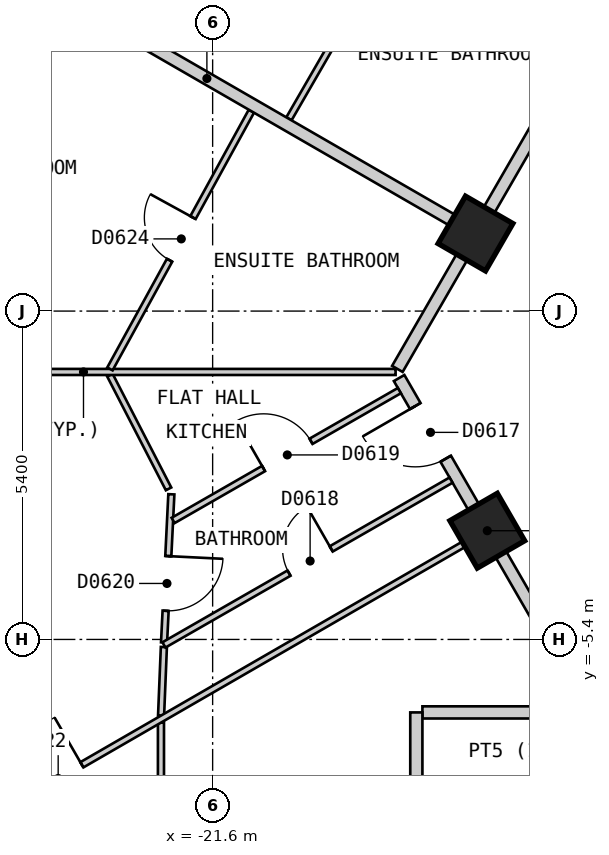
"""IFC4 building model, lengths in metres.
Left out: names, types, materials, properties, quantities, classifications, styles, units other than length and angle.
Written with IfcOpenShell. Run it as: python <this file> out.ifc"""

import sys

from ifc_helpers import new_model, si_unit, direction, frame, frame_2d, origin, origin_2d, place, context, subcontext, project, spatial, polyline, rectangle, outline, extrude, element, fill, save


model = new_model("IFC4")
c1 = context("Model", 3, precision=1e-05, world=origin(), true_north=direction((0.0, 1.0)))
c2 = subcontext(c1, "Body", "Model", "MODEL_VIEW")
j1 = project(units=[si_unit("LENGTHUNIT", "METRE"), si_unit("PLANEANGLEUNIT", "RADIAN")], contexts=[c1])
p1 = place(None, origin())
s1 = spatial("IfcSite", under=j1, at=p1, CompositionType="ELEMENT")
p2 = place(p1, origin())
s2 = spatial("IfcBuilding", under=s1, at=p2, CompositionType="ELEMENT")
p3 = place(p2, frame((0.0, 0.0, 75.0)))
s3 = spatial("IfcBuildingStorey", under=s2, at=p3, CompositionType="ELEMENT", Elevation=75.0)
for number, where, z_axis, x_axis in (
    (1, (-17.083, -3.612, 0.0), (0.0, 0.0, 1.0), (0.5, -0.866, 0.0)),
    (2, (-17.277, 1.275, 0.0), (0.0, 0.0, 1.0), (-0.5, -0.866, 0.0)),
):
    element("IfcColumn", number, at=place(p3, frame(where, z_axis=z_axis, x_axis=x_axis)), inside=s3, PredefinedType="COLUMN", context=c2, shape_type="SweptSolid", body=[
        extrude(rectangle(XDim=0.9, YDim=0.9, at=origin_2d()), origin(), (0.0, 0.0, 1.0), 3.0),
    ])
p4 = place(p3, frame((-15.747, 24.425, 0.0), z_axis=(0.0, 0.0, 1.0), x_axis=(-0.500027479704, -0.866009537788, 0.0)))
e3 = element("IfcWall", 3, at=p4, inside=s3, PredefinedType="SOLIDWALL", context=c2, shape_type="SweptSolid", body=[
    extrude(outline(polyline([(0.0, -0.15), (26.559, -0.15), (26.478, 0.15), (0.08, 0.15), (0.0, -0.15)])), origin(), (0.0, 0.0, 1.0), 2.7),
])
p5 = place(p4, frame((1.227, 0.0, 0.15)))
e4 = element("IfcOpeningElement", 4, at=p5, cuts=e3, PredefinedType="OPENING", context=c2, shape_type="SweptSolid", body=[
    extrude(rectangle(XDim=1.5, YDim=2.1, at=frame_2d((0.75, 1.05))), frame((0.0, 0.16, 0.0), z_axis=(0.0, -1.0, 0.0), x_axis=(1.0, 0.0, 0.0)), (0.0, 0.0, 1.0), 0.32),
])
p6 = place(p4, frame((3.739, 0.0, 0.15)))
e5 = element("IfcOpeningElement", 5, at=p6, cuts=e3, PredefinedType="OPENING", context=c2, shape_type="SweptSolid", body=[
    extrude(rectangle(XDim=1.5, YDim=2.1, at=frame_2d((0.75, 1.05))), frame((0.0, 0.16, 0.0), z_axis=(0.0, -1.0, 0.0), x_axis=(1.0, 0.0, 0.0)), (0.0, 0.0, 1.0), 0.32),
])
p7 = place(p4, frame((6.25, 0.0, 0.15)))
e6 = element("IfcOpeningElement", 6, at=p7, cuts=e3, PredefinedType="OPENING", context=c2, shape_type="SweptSolid", body=[
    extrude(rectangle(XDim=1.5, YDim=2.1, at=frame_2d((0.75, 1.05))), frame((0.0, 0.16, 0.0), z_axis=(0.0, -1.0, 0.0), x_axis=(1.0, 0.0, 0.0)), (0.0, 0.0, 1.0), 0.32),
])
p8 = place(p4, frame((8.761, 0.0, 0.15)))
e7 = element("IfcOpeningElement", 7, at=p8, cuts=e3, PredefinedType="OPENING", context=c2, shape_type="SweptSolid", body=[
    extrude(rectangle(XDim=1.5, YDim=2.1, at=frame_2d((0.75, 1.05))), frame((0.0, 0.16, 0.0), z_axis=(0.0, -1.0, 0.0), x_axis=(1.0, 0.0, 0.0)), (0.0, 0.0, 1.0), 0.32),
])
p9 = place(p4, frame((11.273, 0.0, 0.15)))
e8 = element("IfcOpeningElement", 8, at=p9, cuts=e3, PredefinedType="OPENING", context=c2, shape_type="SweptSolid", body=[
    extrude(rectangle(XDim=1.5, YDim=2.1, at=frame_2d((0.75, 1.05))), frame((0.0, 0.16, 0.0), z_axis=(0.0, -1.0, 0.0), x_axis=(1.0, 0.0, 0.0)), (0.0, 0.0, 1.0), 0.32),
])
p10 = place(p4, frame((13.785, 0.0, 0.15)))
e9 = element("IfcOpeningElement", 9, at=p10, cuts=e3, PredefinedType="OPENING", context=c2, shape_type="SweptSolid", body=[
    extrude(rectangle(XDim=1.5, YDim=2.1, at=frame_2d((0.75, 1.05))), frame((0.0, 0.16, 0.0), z_axis=(0.0, -1.0, 0.0), x_axis=(1.0, 0.0, 0.0)), (0.0, 0.0, 1.0), 0.32),
])
p11 = place(p4, frame((16.296, 0.0, 0.15)))
e10 = element("IfcOpeningElement", 10, at=p11, cuts=e3, PredefinedType="OPENING", context=c2, shape_type="SweptSolid", body=[
    extrude(rectangle(XDim=1.5, YDim=2.1, at=frame_2d((0.75, 1.05))), frame((0.0, 0.16, 0.0), z_axis=(0.0, -1.0, 0.0), x_axis=(1.0, 0.0, 0.0)), (0.0, 0.0, 1.0), 0.32),
])
p12 = place(p4, frame((18.807, 0.0, 0.15)))
e11 = element("IfcOpeningElement", 11, at=p12, cuts=e3, PredefinedType="OPENING", context=c2, shape_type="SweptSolid", body=[
    extrude(rectangle(XDim=1.5, YDim=2.1, at=frame_2d((0.75, 1.05))), frame((0.0, 0.16, 0.0), z_axis=(0.0, -1.0, 0.0), x_axis=(1.0, 0.0, 0.0)), (0.0, 0.0, 1.0), 0.32),
])
p13 = place(p4, frame((21.319, 0.0, 0.15)))
e12 = element("IfcOpeningElement", 12, at=p13, cuts=e3, PredefinedType="OPENING", context=c2, shape_type="SweptSolid", body=[
    extrude(rectangle(XDim=1.5, YDim=2.1, at=frame_2d((0.75, 1.05))), frame((0.0, 0.16, 0.0), z_axis=(0.0, -1.0, 0.0), x_axis=(1.0, 0.0, 0.0)), (0.0, 0.0, 1.0), 0.32),
])
p14 = place(p4, frame((23.831, 0.0, 0.15)))
e13 = element("IfcOpeningElement", 13, at=p14, cuts=e3, PredefinedType="OPENING", context=c2, shape_type="SweptSolid", body=[
    extrude(rectangle(XDim=1.5, YDim=2.1, at=frame_2d((0.75, 1.05))), frame((0.0, 0.16, 0.0), z_axis=(0.0, -1.0, 0.0), x_axis=(1.0, 0.0, 0.0)), (0.0, 0.0, 1.0), 0.32),
])
p15 = place(p3, frame((-29.027, -3.425, 0.0), z_axis=(0.0, 0.0, 1.0), x_axis=(0.500035407905, -0.866004960056, 0.0)))
e14 = element("IfcWall", 14, at=p15, inside=s3, PredefinedType="SOLIDWALL", context=c2, shape_type="SweptSolid", body=[
    extrude(outline(polyline([(0.0, -0.15), (23.094, -0.15), (23.014, 0.15), (0.08, 0.15), (0.0, -0.15)])), origin(), (0.0, 0.0, 1.0), 2.7),
])
p16 = place(p15, frame((1.324, 0.0, 0.15)))
e15 = element("IfcOpeningElement", 15, at=p16, cuts=e14, PredefinedType="OPENING", context=c2, shape_type="SweptSolid", body=[
    extrude(rectangle(XDim=1.5, YDim=2.1, at=frame_2d((0.75, 1.05))), frame((0.0, 0.16, 0.0), z_axis=(0.0, -1.0, 0.0), x_axis=(1.0, 0.0, 0.0)), (0.0, 0.0, 1.0), 0.32),
])
p17 = place(p15, frame((4.031, 0.0, 0.15)))
e16 = element("IfcOpeningElement", 16, at=p17, cuts=e14, PredefinedType="OPENING", context=c2, shape_type="SweptSolid", body=[
    extrude(rectangle(XDim=1.5, YDim=2.1, at=frame_2d((0.75, 1.05))), frame((0.0, 0.16, 0.0), z_axis=(0.0, -1.0, 0.0), x_axis=(1.0, 0.0, 0.0)), (0.0, 0.0, 1.0), 0.32),
])
p18 = place(p15, frame((6.737, 0.0, 0.15)))
e17 = element("IfcOpeningElement", 17, at=p18, cuts=e14, PredefinedType="OPENING", context=c2, shape_type="SweptSolid", body=[
    extrude(rectangle(XDim=1.5, YDim=2.1, at=frame_2d((0.75, 1.05))), frame((0.0, 0.16, 0.0), z_axis=(0.0, -1.0, 0.0), x_axis=(1.0, 0.0, 0.0)), (0.0, 0.0, 1.0), 0.32),
])
p19 = place(p15, frame((9.444, 0.0, 0.15)))
e18 = element("IfcOpeningElement", 18, at=p19, cuts=e14, PredefinedType="OPENING", context=c2, shape_type="SweptSolid", body=[
    extrude(rectangle(XDim=1.5, YDim=2.1, at=frame_2d((0.75, 1.05))), frame((0.0, 0.16, 0.0), z_axis=(0.0, -1.0, 0.0), x_axis=(1.0, 0.0, 0.0)), (0.0, 0.0, 1.0), 0.32),
])
p20 = place(p15, frame((12.151, 0.0, 0.15)))
e19 = element("IfcOpeningElement", 19, at=p20, cuts=e14, PredefinedType="OPENING", context=c2, shape_type="SweptSolid", body=[
    extrude(rectangle(XDim=1.5, YDim=2.1, at=frame_2d((0.75, 1.05))), frame((0.0, 0.16, 0.0), z_axis=(0.0, -1.0, 0.0), x_axis=(1.0, 0.0, 0.0)), (0.0, 0.0, 1.0), 0.32),
])
p21 = place(p15, frame((14.857, 0.0, 0.15)))
e20 = element("IfcOpeningElement", 20, at=p21, cuts=e14, PredefinedType="OPENING", context=c2, shape_type="SweptSolid", body=[
    extrude(rectangle(XDim=1.5, YDim=2.1, at=frame_2d((0.75, 1.05))), frame((0.0, 0.16, 0.0), z_axis=(0.0, -1.0, 0.0), x_axis=(1.0, 0.0, 0.0)), (0.0, 0.0, 1.0), 0.32),
])
p22 = place(p15, frame((17.564, 0.0, 0.15)))
e21 = element("IfcOpeningElement", 21, at=p22, cuts=e14, PredefinedType="OPENING", context=c2, shape_type="SweptSolid", body=[
    extrude(rectangle(XDim=1.5, YDim=2.1, at=frame_2d((0.75, 1.05))), frame((0.0, 0.16, 0.0), z_axis=(0.0, -1.0, 0.0), x_axis=(1.0, 0.0, 0.0)), (0.0, 0.0, 1.0), 0.32),
])
p23 = place(p15, frame((20.27, 0.0, 0.15)))
e22 = element("IfcOpeningElement", 22, at=p23, cuts=e14, PredefinedType="OPENING", context=c2, shape_type="SweptSolid", body=[
    extrude(rectangle(XDim=1.5, YDim=2.1, at=frame_2d((0.75, 1.05))), frame((0.0, 0.16, 0.0), z_axis=(0.0, -1.0, 0.0), x_axis=(1.0, 0.0, 0.0)), (0.0, 0.0, 1.0), 0.32),
])
p24 = place(p3, frame((-18.533, -1.101, 0.0), z_axis=(0.0, 0.0, 1.0), x_axis=(0.500022085096, -0.866012652573, 0.0)))
e23 = element("IfcWall", 23, at=p24, inside=s3, PredefinedType="PARTITIONING", context=c2, shape_type="SweptSolid", body=[
    extrude(rectangle(XDim=6.066, YDim=0.2, at=frame_2d((3.033, 0.0))), origin(), (0.0, 0.0, 1.0), 2.7),
])
p25 = place(p24, frame((0.532, 0.0, 0.0)))
e24 = element("IfcOpeningElement", 24, at=p25, cuts=e23, PredefinedType="OPENING", context=c2, shape_type="SweptSolid", body=[
    extrude(rectangle(XDim=1.0, YDim=2.1, at=frame_2d((0.5, 1.05))), frame((0.0, 0.11, 0.0), z_axis=(0.0, -1.0, 0.0), x_axis=(1.0, 0.0, 0.0)), (0.0, 0.0, 1.0), 0.22),
])
p26 = place(p3, frame((-18.15, -6.6, 0.0), z_axis=(0.0, 0.0, 1.0), x_axis=(1.0, 0.0, 0.0)))
e25 = element("IfcWall", 25, at=p26, inside=s3, PredefinedType="PARTITIONING", context=c2, shape_type="SweptSolid", body=[
    extrude(rectangle(XDim=2.649, YDim=0.2, at=frame_2d((1.324, 0.0))), origin(), (0.0, 0.0, 1.0), 2.7),
])
p27 = place(p3, frame((-18.562, -0.951, 0.0), z_axis=(0.0, 0.0, 1.0), x_axis=(0.499992962407, 0.866029466902, 0.0)))
e26 = element("IfcWall", 26, at=p27, inside=s3, PredefinedType="PARTITIONING", context=c2, shape_type="SweptSolid", body=[
    extrude(rectangle(XDim=20.208, YDim=0.2, at=frame_2d((10.104, 0.0))), origin(), (0.0, 0.0, 1.0), 2.7),
])
p28 = place(p27, frame((9.604, 0.0, 0.0)))
e27 = element("IfcOpeningElement", 27, at=p28, cuts=e26, PredefinedType="OPENING", context=c2, shape_type="SweptSolid", body=[
    extrude(rectangle(XDim=1.0, YDim=2.1, at=frame_2d((0.5, 1.05))), frame((0.0, 0.11, 0.0), z_axis=(0.0, -1.0, 0.0), x_axis=(1.0, 0.0, 0.0)), (0.0, 0.0, 1.0), 0.22),
])
p29 = place(p3, frame((-18.25, -14.386, 0.0), z_axis=(0.0, 0.0, 1.0), x_axis=(0.0, 1.0, 0.0)))
e28 = element("IfcWall", 28, at=p29, inside=s3, PredefinedType="PARTITIONING", context=c2, shape_type="SweptSolid", body=[
    extrude(rectangle(XDim=7.786, YDim=0.2, at=frame_2d((3.893, 0.0))), origin(), (0.0, 0.0, 1.0), 2.7),
])
p30 = place(p29, frame((0.34, 0.0, 0.0)))
e29 = element("IfcOpeningElement", 29, at=p30, cuts=e28, PredefinedType="OPENING", context=c2, shape_type="SweptSolid", body=[
    extrude(rectangle(XDim=1.0, YDim=2.1, at=frame_2d((0.5, 1.05))), frame((0.0, 0.11, 0.0), z_axis=(0.0, -1.0, 0.0), x_axis=(1.0, 0.0, 0.0)), (0.0, 0.0, 1.0), 0.22),
])
p31 = place(p3, frame((-23.289, -1.054, 0.0), z_axis=(0.0, 0.0, 1.0), x_axis=(0.458226112305, -0.888835659726, 0.0)))
e30 = element("IfcWall", 30, at=p31, inside=s3, PredefinedType="PARTITIONING", context=c2, shape_type="SweptSolid", body=[
    extrude(rectangle(XDim=2.104, YDim=0.1, at=frame_2d((1.052, 0.0))), origin(), (0.0, 0.0, 1.0), 2.7),
])
p32 = place(p3, frame((-28.857, -1.001, 0.0), z_axis=(0.0, 0.0, 1.0), x_axis=(1.0, 0.0, 0.0)))
e31 = element("IfcWall", 31, at=p32, inside=s3, PredefinedType="PARTITIONING", context=c2, shape_type="SweptSolid", body=[
    extrude(rectangle(XDim=10.266, YDim=0.1, at=frame_2d((5.133, 0.0))), origin(), (0.0, 0.0, 1.0), 2.7),
])
p33 = place(p32, frame((2.32, 0.0, 0.0)))
e32 = element("IfcOpeningElement", 32, at=p33, cuts=e31, PredefinedType="OPENING", context=c2, shape_type="SweptSolid", body=[
    extrude(rectangle(XDim=0.9, YDim=2.1, at=frame_2d((0.45, 1.05))), frame((0.0, 0.06, 0.0), z_axis=(0.0, -1.0, 0.0), x_axis=(1.0, 0.0, 0.0)), (0.0, 0.0, 1.0), 0.12),
])
p34 = place(p3, frame((-20.345, 3.162, 0.0), z_axis=(0.0, 0.0, 1.0), x_axis=(0.499943653708, 0.866057932887, 0.0)))
e33 = element("IfcWall", 33, at=p34, inside=s3, PredefinedType="PARTITIONING", context=c2, shape_type="SweptSolid", body=[
    extrude(rectangle(XDim=4.873, YDim=0.1, at=frame_2d((2.436, 0.0))), origin(), (0.0, 0.0, 1.0), 2.7),
])
p35 = place(p34, frame((2.011, 0.0, 0.0)))
e34 = element("IfcOpeningElement", 34, at=p35, cuts=e33, PredefinedType="OPENING", context=c2, shape_type="SweptSolid", body=[
    extrude(rectangle(XDim=0.8, YDim=2.1, at=frame_2d((0.4, 1.05))), frame((0.0, 0.06, 0.0), z_axis=(0.0, -1.0, 0.0), x_axis=(1.0, 0.0, 0.0)), (0.0, 0.0, 1.0), 0.12),
])
p36 = place(p3, frame((-23.289, -0.951, 0.0), z_axis=(0.0, 0.0, 1.0), x_axis=(0.481164463081, 0.876630343684, 0.0)))
e35 = element("IfcWall", 35, at=p36, inside=s3, PredefinedType="PARTITIONING", context=c2, shape_type="SweptSolid", body=[
    extrude(rectangle(XDim=4.834, YDim=0.1, at=frame_2d((2.417, 0.0))), origin(), (0.0, 0.0, 1.0), 2.7),
])
p37 = place(p36, frame((2.039, 0.0, 0.0)))
e36 = element("IfcOpeningElement", 36, at=p37, cuts=e35, PredefinedType="OPENING", context=c2, shape_type="SweptSolid", body=[
    extrude(rectangle(XDim=0.8, YDim=2.1, at=frame_2d((0.4, 1.05))), frame((0.0, 0.06, 0.0), z_axis=(0.0, -1.0, 0.0), x_axis=(1.0, 0.0, 0.0)), (0.0, 0.0, 1.0), 0.12),
])
p38 = place(p3, frame((-22.399, -5.45, 0.0), z_axis=(0.0, 0.0, 1.0), x_axis=(0.049129140995, 0.998792434646, 0.0)))
e37 = element("IfcWall", 37, at=p38, inside=s3, PredefinedType="PARTITIONING", context=c2, shape_type="SweptSolid", body=[
    extrude(rectangle(XDim=2.44, YDim=0.1, at=frame_2d((1.22, 0.0))), origin(), (0.0, 0.0, 1.0), 2.7),
])
p39 = place(p38, frame((0.522, 0.0, 0.0)))
e38 = element("IfcOpeningElement", 38, at=p39, cuts=e37, PredefinedType="OPENING", context=c2, shape_type="SweptSolid", body=[
    extrude(rectangle(XDim=0.9, YDim=2.1, at=frame_2d((0.45, 1.05))), frame((0.0, 0.06, 0.0), z_axis=(0.0, -1.0, 0.0), x_axis=(1.0, 0.0, 0.0)), (0.0, 0.0, 1.0), 0.12),
])
p40 = place(p3, frame((-22.448, -6.651, 0.0), z_axis=(0.0, 0.0, 1.0), x_axis=(0.040729401597, 0.99917021365, 0.0)))
e39 = element("IfcWall", 39, at=p40, inside=s3, PredefinedType="PARTITIONING", context=c2, shape_type="SweptSolid", body=[
    extrude(rectangle(XDim=1.127, YDim=0.1, at=frame_2d((0.563, 0.0))), origin(), (0.0, 0.0, 1.0), 2.7),
])
p41 = place(p3, frame((-22.45, -12.846, 0.0), z_axis=(0.0, 0.0, 1.0), x_axis=(0.0, 1.0, 0.0)))
e40 = element("IfcWall", 40, at=p41, inside=s3, PredefinedType="PARTITIONING", context=c2, shape_type="SweptSolid", body=[
    extrude(rectangle(XDim=6.078, YDim=0.1, at=frame_2d((3.039, 0.0))), origin(), (0.0, 0.0, 1.0), 2.7),
])
p42 = place(p41, frame((2.61, 0.0, 0.0)))
e41 = element("IfcOpeningElement", 41, at=p42, cuts=e40, PredefinedType="OPENING", context=c2, shape_type="SweptSolid", body=[
    extrude(rectangle(XDim=0.8, YDim=2.1, at=frame_2d((0.4, 1.05))), frame((0.0, 0.06, 0.0), z_axis=(0.0, -1.0, 0.0), x_axis=(1.0, 0.0, 0.0)), (0.0, 0.0, 1.0), 0.12),
])
p43 = place(p3, frame((-25.83, -8.662, 0.0), z_axis=(0.0, 0.0, 1.0), x_axis=(0.866022959057, 0.500004234368, 0.0)))
e42 = element("IfcWall", 42, at=p43, inside=s3, PredefinedType="PARTITIONING", context=c2, shape_type="SweptSolid", body=[
    extrude(rectangle(XDim=10.0, YDim=0.1, at=frame_2d((5.0, 0.0))), origin(), (0.0, 0.0, 1.0), 2.7),
])
p44 = place(p43, frame((1.501, 0.0, 0.0)))
e43 = element("IfcOpeningElement", 43, at=p44, cuts=e42, PredefinedType="OPENING", context=c2, shape_type="SweptSolid", body=[
    extrude(rectangle(XDim=0.9, YDim=2.1, at=frame_2d((0.45, 1.05))), frame((0.0, 0.06, 0.0), z_axis=(0.0, -1.0, 0.0), x_axis=(1.0, 0.0, 0.0)), (0.0, 0.0, 1.0), 0.12),
])
p45 = place(p3, frame((-22.401, -5.49, 0.0), z_axis=(0.0, 0.0, 1.0), x_axis=(0.867314404256, 0.497760709749, 0.0)))
e44 = element("IfcWall", 44, at=p45, inside=s3, PredefinedType="PARTITIONING", context=c2, shape_type="SweptSolid", body=[
    extrude(rectangle(XDim=5.444, YDim=0.1, at=frame_2d((2.722, 0.0))), origin(), (0.0, 0.0, 1.0), 2.7),
])
p46 = place(p45, frame((2.372, 0.0, 0.0)))
e45 = element("IfcOpeningElement", 45, at=p46, cuts=e44, PredefinedType="OPENING", context=c2, shape_type="SweptSolid", body=[
    extrude(rectangle(XDim=0.8, YDim=2.1, at=frame_2d((0.4, 1.05))), frame((0.0, 0.06, 0.0), z_axis=(0.0, -1.0, 0.0), x_axis=(1.0, 0.0, 0.0)), (0.0, 0.0, 1.0), 0.12),
])
p47 = place(p3, frame((-22.25, -3.443, 0.0), z_axis=(0.0, 0.0, 1.0), x_axis=(0.867362741349, 0.497676476156, 0.0)))
e46 = element("IfcWall", 46, at=p47, inside=s3, PredefinedType="PARTITIONING", context=c2, shape_type="SweptSolid", body=[
    extrude(rectangle(XDim=4.29, YDim=0.1, at=frame_2d((2.145, 0.0))), origin(), (0.0, 0.0, 1.0), 2.7),
])
p48 = place(p47, frame((1.715, 0.0, 0.0)))
e47 = element("IfcOpeningElement", 47, at=p48, cuts=e46, PredefinedType="OPENING", context=c2, shape_type="SweptSolid", body=[
    extrude(rectangle(XDim=0.9, YDim=2.1, at=frame_2d((0.45, 1.05))), frame((0.0, 0.06, 0.0), z_axis=(0.0, -1.0, 0.0), x_axis=(1.0, 0.0, 0.0)), (0.0, 0.0, 1.0), 0.12),
])
p49 = place(p3, frame((-26.025, 6.325, 0.0), z_axis=(0.0, 0.0, 1.0), x_axis=(0.866041268327, -0.499972520799, 0.0)))
e48 = element("IfcWall", 48, at=p49, inside=s3, PredefinedType="PARTITIONING", context=c2, shape_type="SweptSolid", body=[
    extrude(rectangle(XDim=10.0, YDim=0.2, at=frame_2d((5.0, 0.0))), origin(), (0.0, 0.0, 1.0), 2.7),
])
p50 = place(p25, origin())
e49 = element("IfcDoor", 49, at=p50, inside=s3, OperationType="SINGLE_SWING_LEFT", PredefinedType="DOOR", context=c2, shape_type="SweptSolid", body=[
    extrude(rectangle(XDim=1.0, YDim=2.1, at=frame_2d((0.5, 1.05))), frame((0.0, 0.025, 0.0), z_axis=(0.0, -1.0, 0.0), x_axis=(1.0, 0.0, 0.0)), (0.0, 0.0, 1.0), 0.05),
])
fill(e24, e49)
p51 = place(p46, origin())
e50 = element("IfcDoor", 50, at=p51, inside=s3, OperationType="SINGLE_SWING_RIGHT", PredefinedType="DOOR", context=c2, shape_type="SweptSolid", body=[
    extrude(rectangle(XDim=0.8, YDim=2.1, at=frame_2d((0.4, 1.05))), frame((0.0, 0.025, 0.0), z_axis=(0.0, -1.0, 0.0), x_axis=(1.0, 0.0, 0.0)), (0.0, 0.0, 1.0), 0.05),
])
fill(e45, e50)
p52 = place(p48, origin())
e51 = element("IfcDoor", 51, at=p52, inside=s3, OperationType="SINGLE_SWING_LEFT", PredefinedType="DOOR", context=c2, shape_type="SweptSolid", body=[
    extrude(rectangle(XDim=0.9, YDim=2.1, at=frame_2d((0.45, 1.05))), frame((0.0, 0.025, 0.0), z_axis=(0.0, -1.0, 0.0), x_axis=(1.0, 0.0, 0.0)), (0.0, 0.0, 1.0), 0.05),
])
fill(e47, e51)
p53 = place(p39, origin())
e52 = element("IfcDoor", 52, at=p53, inside=s3, OperationType="SINGLE_SWING_RIGHT", PredefinedType="DOOR", context=c2, shape_type="SweptSolid", body=[
    extrude(rectangle(XDim=0.9, YDim=2.1, at=frame_2d((0.45, 1.05))), frame((0.0, 0.025, 0.0), z_axis=(0.0, -1.0, 0.0), x_axis=(1.0, 0.0, 0.0)), (0.0, 0.0, 1.0), 0.05),
])
fill(e38, e52)
p54 = place(p44, origin())
e53 = element("IfcDoor", 53, at=p54, inside=s3, OperationType="SINGLE_SWING_RIGHT", PredefinedType="DOOR", context=c2, shape_type="SweptSolid", body=[
    extrude(rectangle(XDim=0.9, YDim=2.1, at=frame_2d((0.45, 1.05))), frame((0.0, 0.025, 0.0), z_axis=(0.0, -1.0, 0.0), x_axis=(1.0, 0.0, 0.0)), (0.0, 0.0, 1.0), 0.05),
])
fill(e43, e53)
p55 = place(p37, origin())
e54 = element("IfcDoor", 54, at=p55, inside=s3, OperationType="SINGLE_SWING_RIGHT", PredefinedType="DOOR", context=c2, shape_type="SweptSolid", body=[
    extrude(rectangle(XDim=0.8, YDim=2.1, at=frame_2d((0.4, 1.05))), frame((0.0, 0.025, 0.0), z_axis=(0.0, -1.0, 0.0), x_axis=(1.0, 0.0, 0.0)), (0.0, 0.0, 1.0), 0.05),
])
fill(e36, e54)
save(model, sys.argv[1])
